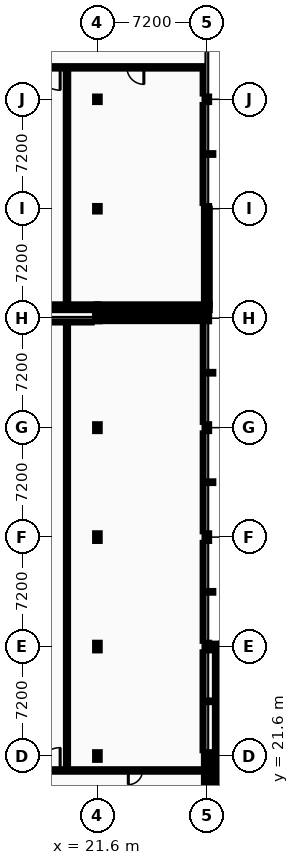
"""IFC4 building model, lengths in metres.
Left out: names, types, materials, properties, quantities, classifications, styles, units other than length and angle.
Written with IfcOpenShell. Run it as: python <this file> out.ifc"""

import sys

from ifc_helpers import new_model, si_unit, direction, frame, frame_2d, origin, origin_2d, place, context, subcontext, project, spatial, rectangle, i_section, extrude, element, fill, save


model = new_model("IFC4")
c1 = context("Model", 3, precision=1e-05, world=origin(), true_north=direction((0.0, 1.0)))
c2 = subcontext(c1, "Body", "Model", "MODEL_VIEW")
j1 = project(units=[si_unit("LENGTHUNIT", "METRE"), si_unit("PLANEANGLEUNIT", "RADIAN")], contexts=[c1])
p1 = place(None, origin())
s1 = spatial("IfcSite", under=j1, at=p1, CompositionType="ELEMENT")
p2 = place(p1, origin())
s2 = spatial("IfcBuilding", under=s1, at=p2, CompositionType="ELEMENT")
p3 = place(p2, frame((0.0, 0.0, 5.2)))
s3 = spatial("IfcBuildingStorey", under=s2, at=p3, CompositionType="ELEMENT", Elevation=5.2)
for number, where, z_axis, x_axis in (
    (1, (21.6, 21.6, 0.0), (0.0, 0.0, 1.0), (1.0, 0.0, 0.0)),
    (2, (21.6, 28.8, 0.0), (0.0, 0.0, 1.0), (1.0, 0.0, 0.0)),
    (3, (21.6, 36.0, 0.0), (0.0, 0.0, 1.0), (1.0, 0.0, 0.0)),
):
    element("IfcColumn", number, at=place(p3, frame(where, z_axis=z_axis, x_axis=x_axis)), inside=s3, PredefinedType="COLUMN", context=c2, shape_type="SweptSolid", body=[
        extrude(i_section(OverallWidth=0.3, OverallDepth=0.5, WebThickness=0.014, FlangeThickness=0.028, FilletRadius=0.027, at=origin_2d()), origin(), (0.0, 0.0, 1.0), 4.4),
    ])
p4 = place(p3, frame((21.6, 43.2, 0.0), z_axis=(0.0, 0.0, 1.0), x_axis=(1.0, 0.0, 0.0)))
e4 = element("IfcColumn", 4, at=p4, inside=s3, PredefinedType="COLUMN", context=c2, shape_type="SweptSolid", body=[
    extrude(i_section(OverallWidth=0.3, OverallDepth=0.45, WebThickness=0.014, FlangeThickness=0.026, FilletRadius=0.027, at=origin_2d()), origin(), (0.0, 0.0, 1.0), 4.4),
])
p5 = place(p3, frame((21.6, 50.4, 0.0), z_axis=(0.0, 0.0, 1.0), x_axis=(1.0, 0.0, 0.0)))
e5 = element("IfcColumn", 5, at=p5, inside=s3, PredefinedType="COLUMN", context=c2, shape_type="SweptSolid", body=[
    extrude(i_section(OverallWidth=0.3, OverallDepth=0.4, WebThickness=0.013, FlangeThickness=0.024, FilletRadius=0.027, at=origin_2d()), origin(), (0.0, 0.0, 1.0), 4.4),
])
p6 = place(p3, frame((21.6, 51.12, 0.0), z_axis=(0.0, 0.0, 1.0), x_axis=(1.0, 0.0, 0.0)))
e6 = element("IfcColumn", 6, at=p6, inside=s3, PredefinedType="COLUMN", context=c2, shape_type="SweptSolid", body=[
    extrude(i_section(OverallWidth=0.3, OverallDepth=0.32, WebThickness=0.011, FlangeThickness=0.021, FilletRadius=0.027, at=origin_2d()), origin(), (0.0, 0.0, 1.0), 4.4),
])
for number, where, z_axis, x_axis in (
    (7, (21.6, 57.6, 0.0), (0.0, 0.0, 1.0), (1.0, 0.0, 0.0)),
    (8, (21.6, 64.8, 0.0), (0.0, 0.0, 1.0), (1.0, 0.0, 0.0)),
):
    element("IfcColumn", number, at=place(p3, frame(where, z_axis=z_axis, x_axis=x_axis)), inside=s3, PredefinedType="COLUMN", context=c2, shape_type="SweptSolid", body=[
        extrude(i_section(OverallWidth=0.3, OverallDepth=0.36, WebThickness=0.012, FlangeThickness=0.022, FilletRadius=0.027, at=origin_2d()), origin(), (0.0, 0.0, 1.0), 4.4),
    ])
for number, where, z_axis, x_axis in (
    (9, (28.8, 21.6, 0.0), (0.0, 0.0, 1.0), (1.0, 0.0, 0.0)),
    (10, (28.8, 28.8, 0.0), (0.0, 0.0, 1.0), (1.0, 0.0, 0.0)),
    (11, (28.8, 36.0, 0.0), (0.0, 0.0, 1.0), (1.0, 0.0, 0.0)),
):
    element("IfcColumn", number, at=place(p3, frame(where, z_axis=z_axis, x_axis=x_axis)), inside=s3, PredefinedType="COLUMN", context=c2, shape_type="SweptSolid", body=[
        extrude(i_section(OverallWidth=0.3, OverallDepth=0.5, WebThickness=0.014, FlangeThickness=0.028, FilletRadius=0.027, at=origin_2d()), origin(), (0.0, 0.0, 1.0), 4.4),
    ])
p7 = place(p3, frame((28.8, 43.2, 0.0), z_axis=(0.0, 0.0, 1.0), x_axis=(1.0, 0.0, 0.0)))
e12 = element("IfcColumn", 12, at=p7, inside=s3, PredefinedType="COLUMN", context=c2, shape_type="SweptSolid", body=[
    extrude(i_section(OverallWidth=0.3, OverallDepth=0.45, WebThickness=0.014, FlangeThickness=0.026, FilletRadius=0.027, at=origin_2d()), origin(), (0.0, 0.0, 1.0), 4.4),
])
p8 = place(p3, frame((28.8, 50.4, 0.0), z_axis=(0.0, 0.0, 1.0), x_axis=(1.0, 0.0, 0.0)))
e13 = element("IfcColumn", 13, at=p8, inside=s3, PredefinedType="COLUMN", context=c2, shape_type="SweptSolid", body=[
    extrude(i_section(OverallWidth=0.3, OverallDepth=0.4, WebThickness=0.013, FlangeThickness=0.024, FilletRadius=0.027, at=origin_2d()), origin(), (0.0, 0.0, 1.0), 4.4),
])
p9 = place(p3, frame((28.8, 51.12, 0.0), z_axis=(0.0, 0.0, 1.0), x_axis=(1.0, 0.0, 0.0)))
e14 = element("IfcColumn", 14, at=p9, inside=s3, PredefinedType="COLUMN", context=c2, shape_type="SweptSolid", body=[
    extrude(i_section(OverallWidth=0.3, OverallDepth=0.32, WebThickness=0.011, FlangeThickness=0.021, FilletRadius=0.027, at=origin_2d()), origin(), (0.0, 0.0, 1.0), 4.4),
])
for number, where, z_axis, x_axis in (
    (15, (28.8, 57.6, 0.0), (0.0, 0.0, 1.0), (1.0, 0.0, 0.0)),
    (16, (28.8, 64.8, 0.0), (0.0, 0.0, 1.0), (1.0, 0.0, 0.0)),
):
    element("IfcColumn", number, at=place(p3, frame(where, z_axis=z_axis, x_axis=x_axis)), inside=s3, PredefinedType="COLUMN", context=c2, shape_type="SweptSolid", body=[
        extrude(i_section(OverallWidth=0.3, OverallDepth=0.36, WebThickness=0.012, FlangeThickness=0.022, FilletRadius=0.027, at=origin_2d()), origin(), (0.0, 0.0, 1.0), 4.4),
    ])
p10 = place(p3, frame((29.52, 21.6, 0.0), z_axis=(0.0, 0.0, 1.0), x_axis=(1.0, 0.0, 0.0)))
e17 = element("IfcColumn", 17, at=p10, inside=s3, PredefinedType="COLUMN", context=c2, shape_type="SweptSolid", body=[
    extrude(i_section(OverallWidth=0.3, OverallDepth=0.4, WebThickness=0.013, FlangeThickness=0.024, FilletRadius=0.027, at=origin_2d()), origin(), (0.0, 0.0, 1.0), 4.4),
])
p11 = place(p3, frame((29.52, 28.8, 0.0), z_axis=(0.0, 0.0, 1.0), x_axis=(1.0, 0.0, 0.0)))
e18 = element("IfcColumn", 18, at=p11, inside=s3, PredefinedType="COLUMN", context=c2, shape_type="SweptSolid", body=[
    extrude(i_section(OverallWidth=0.3, OverallDepth=0.32, WebThickness=0.011, FlangeThickness=0.021, FilletRadius=0.027, at=origin_2d()), origin(), (0.0, 0.0, 1.0), 4.4),
])
p12 = place(p3, frame((28.8, 50.4, 0.0), z_axis=(0.0, 0.0, 1.0), x_axis=(-1.0, 0.0, 0.0)))
e19 = element("IfcWall", 19, at=p12, inside=s3, PredefinedType="STANDARD", context=c2, shape_type="SweptSolid", body=[
    extrude(rectangle(XDim=7.31, YDim=0.38, at=frame_2d((3.655, 0.0))), origin(), (0.0, 0.0, 1.0), 3.88),
])
p13 = place(p12, frame((1.593, 0.0, 0.95)))
e20 = element("IfcOpeningElement", 20, at=p13, cuts=e19, PredefinedType="OPENING", context=c2, shape_type="SweptSolid", body=[
    extrude(rectangle(XDim=1.2, YDim=1.26, at=frame_2d((0.6, 0.63))), frame((0.0, 0.2, 0.0), z_axis=(0.0, -1.0, 0.0), x_axis=(1.0, 0.0, 0.0)), (0.0, 0.0, 1.0), 0.4),
])
p14 = place(p12, frame((4.517, 0.0, 0.95)))
e21 = element("IfcOpeningElement", 21, at=p14, cuts=e19, PredefinedType="OPENING", context=c2, shape_type="SweptSolid", body=[
    extrude(rectangle(XDim=1.2, YDim=1.26, at=frame_2d((0.6, 0.63))), frame((0.0, 0.2, 0.0), z_axis=(0.0, -1.0, 0.0), x_axis=(1.0, 0.0, 0.0)), (0.0, 0.0, 1.0), 0.4),
])
p15 = place(p3, frame((28.8, 14.45, 0.0), z_axis=(0.0, 0.0, 1.0), x_axis=(0.0, 1.0, 0.0)))
e22 = element("IfcWall", 22, at=p15, inside=s3, PredefinedType="STANDARD", context=c2, shape_type="SweptSolid", body=[
    extrude(rectangle(XDim=7.15, YDim=0.38, at=frame_2d((3.575, 0.0))), origin(), (0.0, 0.0, 1.0), 4.185),
])
p16 = place(p15, frame((1.63, 0.0, 0.95)))
e23 = element("IfcOpeningElement", 23, at=p16, cuts=e22, PredefinedType="OPENING", context=c2, shape_type="SweptSolid", body=[
    extrude(rectangle(XDim=1.03, YDim=1.296, at=frame_2d((0.515, 0.648))), frame((0.0, 0.2, 0.0), z_axis=(0.0, -1.0, 0.0), x_axis=(1.0, 0.0, 0.0)), (0.0, 0.0, 1.0), 0.4),
])
p17 = place(p15, frame((4.49, 0.0, 0.95)))
e24 = element("IfcOpeningElement", 24, at=p17, cuts=e22, PredefinedType="OPENING", context=c2, shape_type="SweptSolid", body=[
    extrude(rectangle(XDim=1.03, YDim=1.296, at=frame_2d((0.515, 0.648))), frame((0.0, 0.2, 0.0), z_axis=(0.0, -1.0, 0.0), x_axis=(1.0, 0.0, 0.0)), (0.0, 0.0, 1.0), 0.4),
])
p18 = place(p3, frame((29.52, 21.6, 0.0), z_axis=(0.0, 0.0, 1.0), x_axis=(0.0, -1.0, 0.0)))
e25 = element("IfcWall", 25, at=p18, inside=s3, PredefinedType="STANDARD", context=c2, shape_type="SweptSolid", body=[
    extrude(rectangle(XDim=7.2, YDim=0.38, at=frame_2d((3.6, 0.0))), origin(), (0.0, 0.0, 1.0), 3.88),
])
p19 = place(p18, frame((1.645, 0.0, 0.95)))
e26 = element("IfcOpeningElement", 26, at=p19, cuts=e25, PredefinedType="OPENING", context=c2, shape_type="SweptSolid", body=[
    extrude(rectangle(XDim=1.03, YDim=1.332, at=frame_2d((0.515, 0.666))), frame((0.0, 0.2, 0.0), z_axis=(0.0, -1.0, 0.0), x_axis=(1.0, 0.0, 0.0)), (0.0, 0.0, 1.0), 0.4),
])
p20 = place(p18, frame((4.525, 0.0, 0.95)))
e27 = element("IfcOpeningElement", 27, at=p20, cuts=e25, PredefinedType="OPENING", context=c2, shape_type="SweptSolid", body=[
    extrude(rectangle(XDim=1.03, YDim=1.332, at=frame_2d((0.515, 0.666))), frame((0.0, 0.2, 0.0), z_axis=(0.0, -1.0, 0.0), x_axis=(1.0, 0.0, 0.0)), (0.0, 0.0, 1.0), 0.4),
])
p21 = place(p3, frame((29.52, 28.99, 0.0), z_axis=(0.0, 0.0, 1.0), x_axis=(0.0, -1.0, 0.0)))
e28 = element("IfcWall", 28, at=p21, inside=s3, PredefinedType="STANDARD", context=c2, shape_type="SweptSolid", body=[
    extrude(rectangle(XDim=7.39, YDim=0.38, at=frame_2d((3.695, 0.0))), origin(), (0.0, 0.0, 1.0), 3.88),
])
p22 = place(p21, frame((1.685, 0.0, 0.95)))
e29 = element("IfcOpeningElement", 29, at=p22, cuts=e28, PredefinedType="OPENING", context=c2, shape_type="SweptSolid", body=[
    extrude(rectangle(XDim=1.064, YDim=1.332, at=frame_2d((0.532, 0.666))), frame((0.0, 0.2, 0.0), z_axis=(0.0, -1.0, 0.0), x_axis=(1.0, 0.0, 0.0)), (0.0, 0.0, 1.0), 0.4),
])
p23 = place(p21, frame((4.641, 0.0, 0.95)))
e30 = element("IfcOpeningElement", 30, at=p23, cuts=e28, PredefinedType="OPENING", context=c2, shape_type="SweptSolid", body=[
    extrude(rectangle(XDim=1.064, YDim=1.332, at=frame_2d((0.532, 0.666))), frame((0.0, 0.2, 0.0), z_axis=(0.0, -1.0, 0.0), x_axis=(1.0, 0.0, 0.0)), (0.0, 0.0, 1.0), 0.4),
])
p24 = place(p3, frame((14.4, 51.12, 0.0), z_axis=(0.0, 0.0, 1.0), x_axis=(1.0, 0.0, 0.0)))
e31 = element("IfcWall", 31, at=p24, inside=s3, PredefinedType="STANDARD", context=c2, shape_type="SweptSolid", body=[
    extrude(rectangle(XDim=7.2, YDim=0.38, at=frame_2d((3.6, 0.0))), origin(), (0.0, 0.0, 1.0), 3.88),
])
p25 = place(p24, frame((1.56, 0.0, 0.9)))
e32 = element("IfcOpeningElement", 32, at=p25, cuts=e31, PredefinedType="OPENING", context=c2, shape_type="SweptSolid", body=[
    extrude(rectangle(XDim=1.2, YDim=1.8, at=frame_2d((0.6, 0.9))), frame((0.0, 0.2, 0.0), z_axis=(0.0, -1.0, 0.0), x_axis=(1.0, 0.0, 0.0)), (0.0, 0.0, 1.0), 0.4),
])
p26 = place(p3, frame((21.6, 51.12, 0.0), z_axis=(0.0, 0.0, 1.0), x_axis=(1.0, 0.0, 0.0)))
e33 = element("IfcWall", 33, at=p26, inside=s3, PredefinedType="STANDARD", context=c2, shape_type="SweptSolid", body=[
    extrude(rectangle(XDim=7.39, YDim=0.38, at=frame_2d((3.695, 0.0))), origin(), (0.0, 0.0, 1.0), 3.88),
])
p27 = place(p26, frame((1.767, 0.0, 1.1)))
e34 = element("IfcOpeningElement", 34, at=p27, cuts=e33, PredefinedType="OPENING", context=c2, shape_type="SweptSolid", body=[
    extrude(rectangle(XDim=0.9, YDim=1.6, at=frame_2d((0.45, 0.8))), frame((0.0, 0.2, 0.0), z_axis=(0.0, -1.0, 0.0), x_axis=(1.0, 0.0, 0.0)), (0.0, 0.0, 1.0), 0.4),
])
p28 = place(p26, frame((4.723, 0.0, 1.1)))
e35 = element("IfcOpeningElement", 35, at=p28, cuts=e33, PredefinedType="OPENING", context=c2, shape_type="SweptSolid", body=[
    extrude(rectangle(XDim=0.9, YDim=1.6, at=frame_2d((0.45, 0.8))), frame((0.0, 0.2, 0.0), z_axis=(0.0, -1.0, 0.0), x_axis=(1.0, 0.0, 0.0)), (0.0, 0.0, 1.0), 0.4),
])
p29 = place(p3, frame((28.8, 51.31, 0.0), z_axis=(0.0, 0.0, 1.0), x_axis=(0.0, 1.0, 0.0)))
e36 = element("IfcWall", 36, at=p29, inside=s3, PredefinedType="STANDARD", context=c2, shape_type="SweptSolid", body=[
    extrude(rectangle(XDim=6.29, YDim=0.38, at=frame_2d((3.145, 0.0))), origin(), (0.0, 0.0, 1.0), 3.81),
])
p30 = place(p29, frame((2.63, 0.0, 0.95)))
e37 = element("IfcOpeningElement", 37, at=p30, cuts=e36, PredefinedType="OPENING", context=c2, shape_type="SweptSolid", body=[
    extrude(rectangle(XDim=1.03, YDim=1.26, at=frame_2d((0.515, 0.63))), frame((0.0, 0.2, 0.0), z_axis=(0.0, -1.0, 0.0), x_axis=(1.0, 0.0, 0.0)), (0.0, 0.0, 1.0), 0.4),
])
p31 = place(p3, frame((14.7, 20.65, 0.0), z_axis=(0.0, 0.0, 1.0), x_axis=(1.0, 0.0, 0.0)))
e38 = element("IfcWall", 38, at=p31, inside=s3, PredefinedType="PARTITIONING", context=c2, shape_type="SweptSolid", body=[
    extrude(rectangle(XDim=13.9, YDim=0.16, at=frame_2d((6.95, 0.0))), origin(), (0.0, 0.0, 1.0), 4.185),
])
p32 = place(p31, frame((2.95, 0.0, 0.0)))
e39 = element("IfcOpeningElement", 39, at=p32, cuts=e38, PredefinedType="OPENING", context=c2, shape_type="SweptSolid", body=[
    extrude(rectangle(XDim=1.5, YDim=2.2, at=frame_2d((0.75, 1.1))), frame((0.0, 0.09, 0.0), z_axis=(0.0, -1.0, 0.0), x_axis=(1.0, 0.0, 0.0)), (0.0, 0.0, 1.0), 0.18),
])
p33 = place(p31, frame((8.934, 0.0, 0.0)))
e40 = element("IfcOpeningElement", 40, at=p33, cuts=e38, PredefinedType="OPENING", context=c2, shape_type="SweptSolid", body=[
    extrude(rectangle(XDim=0.932, YDim=2.124, at=frame_2d((0.466, 1.062))), frame((0.0, 0.09, 0.0), z_axis=(0.0, -1.0, 0.0), x_axis=(1.0, 0.0, 0.0)), (0.0, 0.0, 1.0), 0.18),
])
p34 = place(p3, frame((14.78, 50.2, 0.0), z_axis=(0.0, 0.0, 1.0), x_axis=(1.0, 0.0, 0.0)))
e41 = element("IfcWall", 41, at=p34, inside=s3, PredefinedType="PARTITIONING", context=c2, shape_type="SweptSolid", body=[
    extrude(rectangle(XDim=6.44, YDim=0.16, at=frame_2d((3.22, 0.0))), origin(), (0.0, 0.0, 1.0), 3.88),
])
p35 = place(p3, frame((14.7, 66.9, 0.0), z_axis=(0.0, 0.0, 1.0), x_axis=(1.0, 0.0, 0.0)))
e42 = element("IfcWall", 42, at=p35, inside=s3, PredefinedType="PARTITIONING", context=c2, shape_type="SweptSolid", body=[
    extrude(rectangle(XDim=13.9, YDim=0.158, at=frame_2d((6.95, 0.0))), origin(), (0.0, 0.0, 1.0), 4.185),
])
p36 = place(p35, frame((2.95, 0.0, 0.0)))
e43 = element("IfcOpeningElement", 43, at=p36, cuts=e42, PredefinedType="OPENING", context=c2, shape_type="SweptSolid", body=[
    extrude(rectangle(XDim=1.5, YDim=2.2, at=frame_2d((0.75, 1.1))), frame((0.0, 0.089, 0.0), z_axis=(0.0, -1.0, 0.0), x_axis=(1.0, 0.0, 0.0)), (0.0, 0.0, 1.0), 0.178),
])
p37 = place(p35, frame((8.843, 0.0, 0.0)))
e44 = element("IfcOpeningElement", 44, at=p37, cuts=e42, PredefinedType="OPENING", context=c2, shape_type="SweptSolid", body=[
    extrude(rectangle(XDim=1.114, YDim=2.124, at=frame_2d((0.557, 1.062))), frame((0.0, 0.089, 0.0), z_axis=(0.0, -1.0, 0.0), x_axis=(1.0, 0.0, 0.0)), (0.0, 0.0, 1.0), 0.178),
])
p38 = place(p3, frame((19.6, 20.73, 0.0), z_axis=(0.0, 0.0, 1.0), x_axis=(0.0, 1.0, 0.0)))
e45 = element("IfcWall", 45, at=p38, inside=s3, PredefinedType="PARTITIONING", context=c2, shape_type="SweptSolid", body=[
    extrude(rectangle(XDim=29.39, YDim=0.135, at=frame_2d((14.695, 0.0))), origin(), (0.0, 0.0, 1.0), 4.185),
])
p39 = place(p3, frame((19.6, 51.32, 0.0), z_axis=(0.0, 0.0, 1.0), x_axis=(0.0, 1.0, 0.0)))
e46 = element("IfcWall", 46, at=p39, inside=s3, PredefinedType="PARTITIONING", context=c2, shape_type="SweptSolid", body=[
    extrude(rectangle(XDim=15.501, YDim=0.158, at=frame_2d((7.75, 0.0))), origin(), (0.0, 0.0, 1.0), 4.185),
])
p40 = place(p3, frame((28.6, 21.98, 0.0), z_axis=(0.0, 0.0, 1.0), x_axis=(0.0, 1.0, 0.0)))
e47 = element("IfcWall", 47, at=p40, inside=s3, PredefinedType="PARTITIONING", context=c2, shape_type="SweptSolid", body=[
    extrude(rectangle(XDim=6.44, YDim=0.16, at=frame_2d((3.22, 0.0))), origin(), (0.0, 0.0, 1.0), 3.88),
])
p41 = place(p3, frame((28.6, 29.18, 0.0), z_axis=(0.0, 0.0, 1.0), x_axis=(0.0, 1.0, 0.0)))
e48 = element("IfcWall", 48, at=p41, inside=s3, PredefinedType="PARTITIONING", context=c2, shape_type="SweptSolid", body=[
    extrude(rectangle(XDim=6.44, YDim=0.15, at=frame_2d((3.22, 0.0))), origin(), (0.0, 0.0, 1.0), 3.81),
])
p42 = place(p3, frame((28.6, 36.38, 0.0), z_axis=(0.0, 0.0, 1.0), x_axis=(0.0, 1.0, 0.0)))
e49 = element("IfcWall", 49, at=p42, inside=s3, PredefinedType="PARTITIONING", context=c2, shape_type="SweptSolid", body=[
    extrude(rectangle(XDim=6.44, YDim=0.142, at=frame_2d((3.22, 0.0))), origin(), (0.0, 0.0, 1.0), 3.81),
])
p43 = place(p3, frame((28.6, 43.58, 0.0), z_axis=(0.0, 0.0, 1.0), x_axis=(0.0, 1.0, 0.0)))
e50 = element("IfcWall", 50, at=p43, inside=s3, PredefinedType="PARTITIONING", context=c2, shape_type="SweptSolid", body=[
    extrude(rectangle(XDim=6.44, YDim=0.135, at=frame_2d((3.22, 0.0))), origin(), (0.0, 0.0, 1.0), 3.81),
])
p44 = place(p3, frame((28.6, 57.98, 0.0), z_axis=(0.0, 0.0, 1.0), x_axis=(0.0, 1.0, 0.0)))
e51 = element("IfcWall", 51, at=p44, inside=s3, PredefinedType="PARTITIONING", context=c2, shape_type="SweptSolid", body=[
    extrude(rectangle(XDim=6.44, YDim=0.16, at=frame_2d((3.22, 0.0))), origin(), (0.0, 0.0, 1.0), 3.81),
])
p45 = place(p3, frame((28.6, 65.18, 0.0), z_axis=(0.0, 0.0, 1.0), x_axis=(0.0, 1.0, 0.0)))
e52 = element("IfcWall", 52, at=p45, inside=s3, PredefinedType="PARTITIONING", context=c2, shape_type="SweptSolid", body=[
    extrude(rectangle(XDim=1.641, YDim=0.15, at=frame_2d((0.821, 0.0))), origin(), (0.0, 0.0, 1.0), 3.81),
])
p46 = place(p13, origin())
e53 = element("IfcWindow", 53, at=p46, inside=s3, PartitioningType="SINGLE_PANEL", PredefinedType="WINDOW", context=c2, shape_type="SweptSolid", body=[
    extrude(rectangle(XDim=1.2, YDim=1.26, at=frame_2d((0.6, 0.63))), frame((0.0, 0.03, 0.0), z_axis=(0.0, -1.0, 0.0), x_axis=(1.0, 0.0, 0.0)), (0.0, 0.0, 1.0), 0.06),
])
fill(e20, e53)
p47 = place(p14, origin())
e54 = element("IfcWindow", 54, at=p47, inside=s3, PartitioningType="SINGLE_PANEL", PredefinedType="WINDOW", context=c2, shape_type="SweptSolid", body=[
    extrude(rectangle(XDim=1.2, YDim=1.26, at=frame_2d((0.6, 0.63))), frame((0.0, 0.03, 0.0), z_axis=(0.0, -1.0, 0.0), x_axis=(1.0, 0.0, 0.0)), (0.0, 0.0, 1.0), 0.06),
])
fill(e21, e54)
p48 = place(p17, origin())
e55 = element("IfcWindow", 55, at=p48, inside=s3, PartitioningType="SINGLE_PANEL", PredefinedType="WINDOW", context=c2, shape_type="SweptSolid", body=[
    extrude(rectangle(XDim=1.03, YDim=1.296, at=frame_2d((0.515, 0.648))), frame((0.0, 0.03, 0.0), z_axis=(0.0, -1.0, 0.0), x_axis=(1.0, 0.0, 0.0)), (0.0, 0.0, 1.0), 0.06),
])
fill(e24, e55)
p49 = place(p19, origin())
e56 = element("IfcWindow", 56, at=p49, inside=s3, PartitioningType="SINGLE_PANEL", PredefinedType="WINDOW", context=c2, shape_type="SweptSolid", body=[
    extrude(rectangle(XDim=1.03, YDim=1.332, at=frame_2d((0.515, 0.666))), frame((0.0, 0.03, 0.0), z_axis=(0.0, -1.0, 0.0), x_axis=(1.0, 0.0, 0.0)), (0.0, 0.0, 1.0), 0.06),
])
fill(e26, e56)
p50 = place(p22, origin())
e57 = element("IfcWindow", 57, at=p50, inside=s3, PartitioningType="SINGLE_PANEL", PredefinedType="WINDOW", context=c2, shape_type="SweptSolid", body=[
    extrude(rectangle(XDim=1.064, YDim=1.332, at=frame_2d((0.532, 0.666))), frame((0.0, 0.03, 0.0), z_axis=(0.0, -1.0, 0.0), x_axis=(1.0, 0.0, 0.0)), (0.0, 0.0, 1.0), 0.06),
])
fill(e29, e57)
p51 = place(p23, origin())
e58 = element("IfcWindow", 58, at=p51, inside=s3, PartitioningType="SINGLE_PANEL", PredefinedType="WINDOW", context=c2, shape_type="SweptSolid", body=[
    extrude(rectangle(XDim=1.064, YDim=1.332, at=frame_2d((0.532, 0.666))), frame((0.0, 0.03, 0.0), z_axis=(0.0, -1.0, 0.0), x_axis=(1.0, 0.0, 0.0)), (0.0, 0.0, 1.0), 0.06),
])
fill(e30, e58)
p52 = place(p27, origin())
e59 = element("IfcWindow", 59, at=p52, inside=s3, PartitioningType="SINGLE_PANEL", PredefinedType="WINDOW", context=c2, shape_type="SweptSolid", body=[
    extrude(rectangle(XDim=0.9, YDim=1.6, at=frame_2d((0.45, 0.8))), frame((0.0, 0.03, 0.0), z_axis=(0.0, -1.0, 0.0), x_axis=(1.0, 0.0, 0.0)), (0.0, 0.0, 1.0), 0.06),
])
fill(e34, e59)
p53 = place(p28, origin())
e60 = element("IfcWindow", 60, at=p53, inside=s3, PartitioningType="SINGLE_PANEL", PredefinedType="WINDOW", context=c2, shape_type="SweptSolid", body=[
    extrude(rectangle(XDim=0.9, YDim=1.6, at=frame_2d((0.45, 0.8))), frame((0.0, 0.03, 0.0), z_axis=(0.0, -1.0, 0.0), x_axis=(1.0, 0.0, 0.0)), (0.0, 0.0, 1.0), 0.06),
])
fill(e35, e60)
p54 = place(p30, origin())
e61 = element("IfcWindow", 61, at=p54, inside=s3, PartitioningType="SINGLE_PANEL", PredefinedType="WINDOW", context=c2, shape_type="SweptSolid", body=[
    extrude(rectangle(XDim=1.03, YDim=1.26, at=frame_2d((0.515, 0.63))), frame((0.0, 0.03, 0.0), z_axis=(0.0, -1.0, 0.0), x_axis=(1.0, 0.0, 0.0)), (0.0, 0.0, 1.0), 0.06),
])
fill(e37, e61)
p55 = place(p32, frame((1.5, 0.0, 0.0), z_axis=(0.0, 0.0, 1.0), x_axis=(-1.0, 0.0, 0.0)))
e62 = element("IfcDoor", 62, at=p55, inside=s3, OperationType="DOUBLE_DOOR_SINGLE_SWING", PredefinedType="DOOR", context=c2, shape_type="SweptSolid", body=[
    extrude(rectangle(XDim=1.5, YDim=2.2, at=frame_2d((0.75, 1.1))), frame((0.0, 0.025, 0.0), z_axis=(0.0, -1.0, 0.0), x_axis=(1.0, 0.0, 0.0)), (0.0, 0.0, 1.0), 0.05),
])
fill(e39, e62)
p56 = place(p33, frame((0.932, 0.0, 0.0), z_axis=(0.0, 0.0, 1.0), x_axis=(-1.0, 0.0, 0.0)))
e63 = element("IfcDoor", 63, at=p56, inside=s3, OperationType="SINGLE_SWING_LEFT", PredefinedType="DOOR", context=c2, shape_type="SweptSolid", body=[
    extrude(rectangle(XDim=0.932, YDim=2.124, at=frame_2d((0.466, 1.062))), frame((0.0, 0.025, 0.0), z_axis=(0.0, -1.0, 0.0), x_axis=(1.0, 0.0, 0.0)), (0.0, 0.0, 1.0), 0.05),
])
fill(e40, e63)
p57 = place(p36, origin())
e64 = element("IfcDoor", 64, at=p57, inside=s3, OperationType="DOUBLE_DOOR_SINGLE_SWING", PredefinedType="DOOR", context=c2, shape_type="SweptSolid", body=[
    extrude(rectangle(XDim=1.5, YDim=2.2, at=frame_2d((0.75, 1.1))), frame((0.0, 0.025, 0.0), z_axis=(0.0, -1.0, 0.0), x_axis=(1.0, 0.0, 0.0)), (0.0, 0.0, 1.0), 0.05),
])
fill(e43, e64)
p58 = place(p37, origin())
e65 = element("IfcDoor", 65, at=p58, inside=s3, OperationType="SINGLE_SWING_RIGHT", PredefinedType="DOOR", context=c2, shape_type="SweptSolid", body=[
    extrude(rectangle(XDim=1.114, YDim=2.124, at=frame_2d((0.557, 1.062))), frame((0.0, 0.025, 0.0), z_axis=(0.0, -1.0, 0.0), x_axis=(1.0, 0.0, 0.0)), (0.0, 0.0, 1.0), 0.05),
])
fill(e44, e65)
save(model, sys.argv[1])
